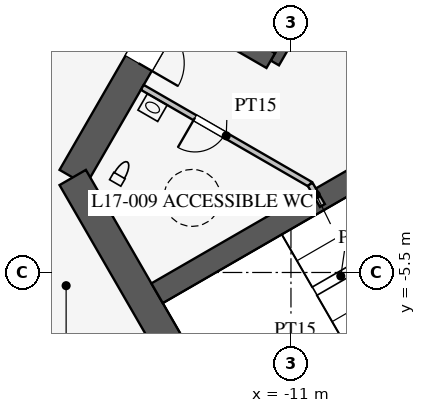
"""IFC4 building model, lengths in metres.
Left out: names, types, materials, properties, quantities, classifications, styles, units other than length and angle.
Written with IfcOpenShell. Run it as: python <this file> out.ifc"""

import sys

from ifc_helpers import new_model, si_unit, direction, frame, frame_2d, origin, place, context, subcontext, project, spatial, rectangle, extrude, element, fill, save


model = new_model("IFC4")
c1 = context("Model", 3, precision=1e-05, world=origin(), true_north=direction((0.0, 1.0)))
c2 = subcontext(c1, "Body", "Model", "MODEL_VIEW")
j1 = project(units=[si_unit("LENGTHUNIT", "METRE"), si_unit("PLANEANGLEUNIT", "RADIAN")], contexts=[c1])
p1 = place(None, origin())
s1 = spatial("IfcSite", under=j1, at=p1, CompositionType="ELEMENT")
p2 = place(p1, origin())
s2 = spatial("IfcBuilding", under=s1, at=p2, CompositionType="ELEMENT")
p3 = place(p2, frame((0.0, 0.0, 75.3)))
s3 = spatial("IfcBuildingStorey", under=s2, at=p3, CompositionType="ELEMENT", Elevation=75.3)
p4 = place(p3, frame((-5.773, 16.0, 0.0), z_axis=(0.0, 0.0, 1.0), x_axis=(-0.500002442456, -0.866023993627, 0.0)))
e1 = element("IfcWall", 1, at=p4, inside=s3, PredefinedType="SHEAR", context=c2, shape_type="SweptSolid", body=[
    extrude(rectangle(XDim=21.939, YDim=0.8, at=frame_2d((10.97, 0.0))), origin(), (0.0, 0.0, 1.0), 4.2),
])
p5 = place(p4, frame((17.27, 0.0, 0.0)))
e2 = element("IfcOpeningElement", 2, at=p5, cuts=e1, PredefinedType="OPENING", context=c2, shape_type="SweptSolid", body=[
    extrude(rectangle(XDim=1.2, YDim=2.1, at=frame_2d((0.6, 1.05))), frame((0.0, 0.41, 0.0), z_axis=(0.0, -1.0, 0.0), x_axis=(1.0, 0.0, 0.0)), (0.0, 0.0, 1.0), 0.82),
])
p6 = place(p4, frame((3.47, 0.0, 0.0)))
e3 = element("IfcOpeningElement", 3, at=p6, cuts=e1, PredefinedType="OPENING", context=c2, shape_type="SweptSolid", body=[
    extrude(rectangle(XDim=1.2, YDim=2.1, at=frame_2d((0.6, 1.05))), frame((0.0, 0.41, 0.0), z_axis=(0.0, -1.0, 0.0), x_axis=(1.0, 0.0, 0.0)), (0.0, 0.0, 1.0), 0.82),
])
p7 = place(p3, frame((-16.743, -3.0, 0.0), z_axis=(0.0, 0.0, 1.0), x_axis=(0.499995765644, -0.866027848477, 0.0)))
e4 = element("IfcWall", 4, at=p7, inside=s3, PredefinedType="SHEAR", context=c2, shape_type="SweptSolid", body=[
    extrude(rectangle(XDim=11.547, YDim=0.8, at=frame_2d((5.773, 0.0))), origin(), (0.0, 0.0, 1.0), 4.2),
])
p8 = place(p3, frame((-5.724, 9.886, 0.0), z_axis=(0.0, 0.0, 1.0), x_axis=(-0.500001763848, -0.866024385424, 0.0)))
e5 = element("IfcWall", 5, at=p8, inside=s3, PredefinedType="SHEAR", context=c2, shape_type="SweptSolid", body=[
    extrude(rectangle(XDim=11.4, YDim=0.25, at=frame_2d((5.7, 0.0))), origin(), (0.0, 0.0, 1.0), 4.2),
])
p9 = place(p8, frame((6.525, 0.0, 0.0)))
e6 = element("IfcOpeningElement", 6, at=p9, cuts=e5, PredefinedType="OPENING", context=c2, shape_type="SweptSolid", body=[
    extrude(rectangle(XDim=1.2, YDim=2.2, at=frame_2d((0.6, 1.1))), frame((0.0, 0.135, 0.0), z_axis=(0.0, -1.0, 0.0), x_axis=(1.0, 0.0, 0.0)), (0.0, 0.0, 1.0), 0.27),
])
p10 = place(p8, frame((9.375, 0.0, 0.0)))
e7 = element("IfcOpeningElement", 7, at=p10, cuts=e5, PredefinedType="OPENING", context=c2, shape_type="SweptSolid", body=[
    extrude(rectangle(XDim=1.2, YDim=2.2, at=frame_2d((0.6, 1.1))), frame((0.0, 0.135, 0.0), z_axis=(0.0, -1.0, 0.0), x_axis=(1.0, 0.0, 0.0)), (0.0, 0.0, 1.0), 0.27),
])
p11 = place(p3, frame((-11.532, 0.076, 0.0), z_axis=(0.0, 0.0, 1.0), x_axis=(-0.866005588531, 0.500034319456, 0.0)))
e8 = element("IfcWall", 8, at=p11, inside=s3, PredefinedType="SHEAR", context=c2, shape_type="SweptSolid", body=[
    extrude(rectangle(XDim=2.575, YDim=0.45, at=frame_2d((1.288, 0.0))), origin(), (0.0, 0.0, 1.0), 4.2),
])
for number, where, z_axis, x_axis in (
    (9, (-6.663, -1.509, 0.0), (0.0, 0.0, 1.0), (-0.866, -0.5, 0.0)),
    (10, (-4.638, -5.016, 0.0), (0.0, 0.0, 1.0), (-0.866, -0.5, 0.0)),
):
    element("IfcWall", number, at=place(p3, frame(where, z_axis=z_axis, x_axis=x_axis)), inside=s3, PredefinedType="SHEAR", context=c2, shape_type="SweptSolid", body=[
        extrude(rectangle(XDim=9.075, YDim=0.6, at=frame_2d((4.538, 0.0))), origin(), (0.0, 0.0, 1.0), 4.2),
    ])
p12 = place(p3, frame((-10.495, -3.178, 0.0), z_axis=(0.0, 0.0, 1.0), x_axis=(-0.86602216432, 0.500005610874, 0.0)))
e11 = element("IfcWall", 11, at=p12, inside=s3, PredefinedType="PARTITIONING", context=c2, shape_type="SweptSolid", body=[
    extrude(rectangle(XDim=5.1, YDim=0.15, at=frame_2d((2.55, 0.0))), origin(), (0.0, 0.0, 1.0), 4.0),
])
p13 = place(p12, frame((2.6, 0.0, 0.0)))
e12 = element("IfcOpeningElement", 12, at=p13, cuts=e11, PredefinedType="OPENING", context=c2, shape_type="SweptSolid", body=[
    extrude(rectangle(XDim=0.9, YDim=2.1, at=frame_2d((0.45, 1.05))), frame((0.0, 0.085, 0.0), z_axis=(0.0, -1.0, 0.0), x_axis=(1.0, 0.0, 0.0)), (0.0, 0.0, 1.0), 0.17),
])
p14 = place(p3, frame((-10.495, -3.178, 0.0), z_axis=(0.0, 0.0, 1.0), x_axis=(0.499842556608, -0.866116284689, 0.0)))
e13 = element("IfcWall", 13, at=p14, inside=s3, PredefinedType="PARTITIONING", context=c2, shape_type="SweptSolid", body=[
    extrude(rectangle(XDim=0.645, YDim=0.15, at=frame_2d((0.323, 0.0))), origin(), (0.0, 0.0, 1.0), 4.0),
])
p15 = place(p3, frame((-0.016, 30.491, 0.0), z_axis=(0.0, 0.0, 1.0), x_axis=(-0.50000091641, -0.866024874695, 0.0)))
e14 = element("IfcWall", 14, at=p15, inside=s3, PredefinedType="PARTITIONING", context=c2, shape_type="SweptSolid", body=[
    extrude(rectangle(XDim=52.796, YDim=0.12, at=frame_2d((26.398, 0.0))), origin(), (0.0, 0.0, 1.0), 2.9),
])
p16 = place(p15, frame((10.2, 0.0, 0.15)))
e15 = element("IfcOpeningElement", 15, at=p16, cuts=e14, PredefinedType="OPENING", context=c2, shape_type="SweptSolid", body=[
    extrude(rectangle(XDim=1.8, YDim=2.1, at=frame_2d((0.9, 1.05))), frame((0.0, 0.07, 0.0), z_axis=(0.0, -1.0, 0.0), x_axis=(1.0, 0.0, 0.0)), (0.0, 0.0, 1.0), 0.14),
])
p17 = place(p15, frame((40.8, 0.0, 0.15)))
e16 = element("IfcOpeningElement", 16, at=p17, cuts=e14, PredefinedType="OPENING", context=c2, shape_type="SweptSolid", body=[
    extrude(rectangle(XDim=1.8, YDim=2.1, at=frame_2d((0.9, 1.05))), frame((0.0, 0.07, 0.0), z_axis=(0.0, -1.0, 0.0), x_axis=(1.0, 0.0, 0.0)), (0.0, 0.0, 1.0), 0.14),
])
p18 = place(p13, origin())
e17 = element("IfcDoor", 17, at=p18, inside=s3, OperationType="SINGLE_SWING_RIGHT", PredefinedType="DOOR", context=c2, shape_type="SweptSolid", body=[
    extrude(rectangle(XDim=0.9, YDim=2.1, at=frame_2d((0.45, 1.05))), frame((0.0, 0.025, 0.0), z_axis=(0.0, -1.0, 0.0), x_axis=(1.0, 0.0, 0.0)), (0.0, 0.0, 1.0), 0.05),
])
fill(e12, e17)
p19 = place(p5, origin())
e18 = element("IfcDoor", 18, at=p19, inside=s3, OperationType="SINGLE_SWING_RIGHT", PredefinedType="DOOR", context=c2, shape_type="SweptSolid", body=[
    extrude(rectangle(XDim=1.2, YDim=2.1, at=frame_2d((0.6, 1.05))), frame((0.0, 0.025, 0.0), z_axis=(0.0, -1.0, 0.0), x_axis=(1.0, 0.0, 0.0)), (0.0, 0.0, 1.0), 0.05),
])
fill(e2, e18)
save(model, sys.argv[1])
